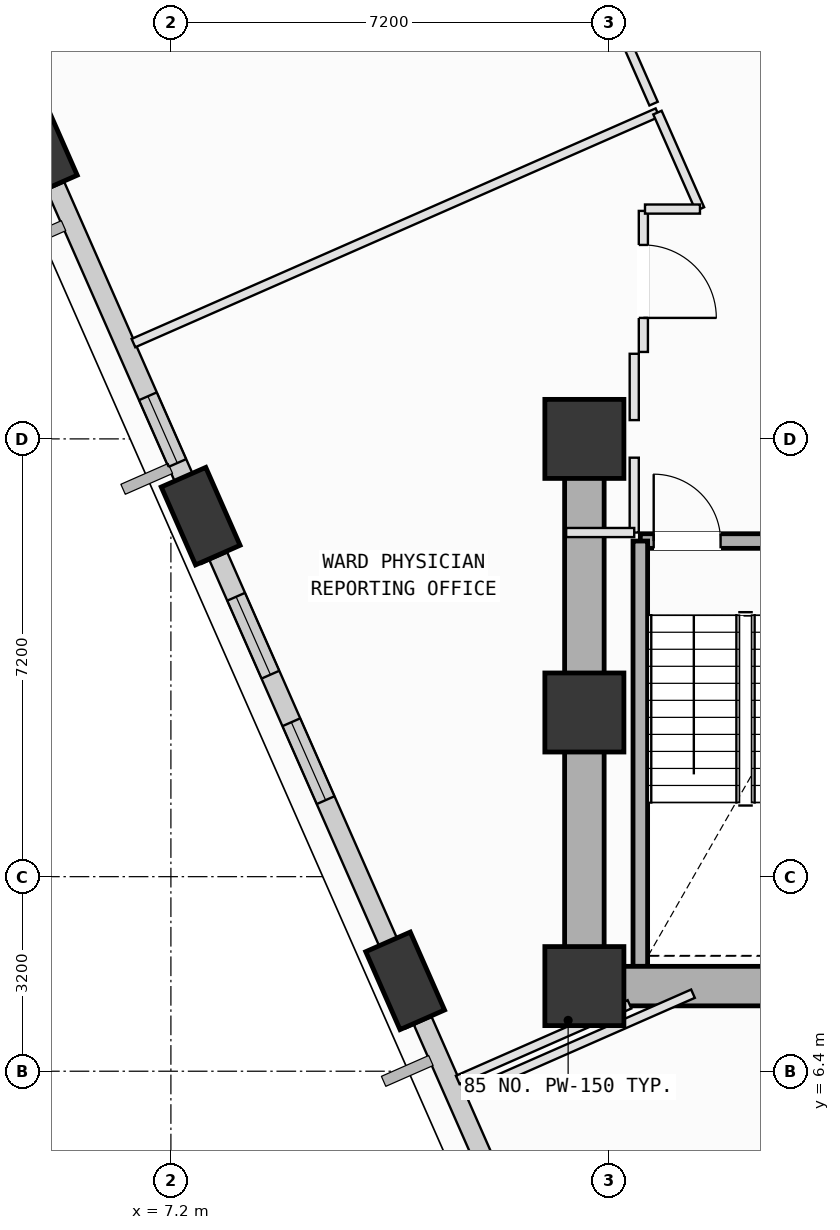
"""IFC4 building model, lengths in metres.
Left out: names, types, materials, properties, quantities, classifications, styles, units other than length and angle.
Written with IfcOpenShell. Run it as: python <this file> out.ifc"""

import sys

from ifc_helpers import new_model, si_unit, direction, frame, frame_2d, origin, origin_2d, place, context, subcontext, project, spatial, rectangle, extrude, element, fill, save


model = new_model("IFC4")
c1 = context("Model", 3, precision=1e-05, world=origin(), true_north=direction((0.0, 1.0)))
c2 = subcontext(c1, "Body", "Model", "MODEL_VIEW")
j1 = project(units=[si_unit("LENGTHUNIT", "METRE"), si_unit("PLANEANGLEUNIT", "RADIAN")], contexts=[c1])
p1 = place(None, origin())
s1 = spatial("IfcSite", under=j1, at=p1, CompositionType="ELEMENT")
p2 = place(p1, origin())
s2 = spatial("IfcBuilding", under=s1, at=p2, CompositionType="ELEMENT")
p3 = place(p2, frame((0.0, 0.0, 124.4)))
s3 = spatial("IfcBuildingStorey", under=s2, at=p3, CompositionType="ELEMENT", Elevation=124.4)
for number, where, z_axis, x_axis in (
    (1, (14.0, 7.8, 0.0), (0.0, 0.0, 1.0), (1.0, 0.0, 0.0)),
    (2, (14.0, 12.3, 0.0), (0.0, 0.0, 1.0), (1.0, 0.0, 0.0)),
    (3, (14.0, 16.8, 0.0), (0.0, 0.0, 1.0), (1.0, 0.0, 0.0)),
):
    element("IfcColumn", number, at=place(p3, frame(where, z_axis=z_axis, x_axis=x_axis)), inside=s3, PredefinedType="COLUMN", context=c2, shape_type="SweptSolid", body=[
        extrude(rectangle(XDim=1.3, YDim=1.3, at=origin_2d()), origin(), (0.0, 0.0, 1.0), 4.0),
    ])
p4 = place(p3, frame((5.011, 21.616, 0.002), z_axis=(0.014134085479, -0.117561620848, 0.992965000859), x_axis=(-0.508356859263, 0.854299122945, 0.108380404941)))
e4 = element("IfcColumn", 4, at=p4, inside=s3, PredefinedType="COLUMN", context=c2, shape_type="SweptSolid", body=[
    extrude(rectangle(XDim=1.4, YDim=0.8, at=origin_2d()), origin(), (0.0, 0.0, 1.0), 4.025),
])
p5 = place(p3, frame((7.689, 15.529, 0.002), z_axis=(0.039028472519, -0.106402663027, 0.993556868847), x_axis=(-0.691283232583, 0.715098751962, 0.103736528239)))
e5 = element("IfcColumn", 5, at=p5, inside=s3, PredefinedType="COLUMN", context=c2, shape_type="SweptSolid", body=[
    extrude(rectangle(XDim=1.4, YDim=0.8, at=origin_2d()), origin(), (0.0, 0.0, 1.0), 4.022),
])
p6 = place(p3, frame((11.052, 7.886, 0.002), z_axis=(0.070387084665, -0.092231352319, 0.993246714549), x_axis=(-0.871708970216, 0.478378450059, 0.106195714432)))
e6 = element("IfcColumn", 6, at=p6, inside=s3, PredefinedType="COLUMN", context=c2, shape_type="SweptSolid", body=[
    extrude(rectangle(XDim=1.4, YDim=0.8, at=origin_2d()), origin(), (0.0, 0.0, 1.0), 4.023),
])
p7 = place(p3, frame((7.581, 15.775, 0.0), z_axis=(0.0, 0.0, 1.0), x_axis=(-0.40276317854, 0.915304223749, 0.0)))
e7 = element("IfcWall", 7, at=p7, inside=s3, PredefinedType="SOLIDWALL", context=c2, shape_type="SweptSolid", body=[
    extrude(rectangle(XDim=5.662, YDim=0.32, at=frame_2d((2.831, 0.0))), origin(), (0.0, 0.0, 1.0), 3.165),
])
p8 = place(p7, frame((0.686, 0.0, 0.75)))
e8 = element("IfcOpeningElement", 8, at=p8, cuts=e7, PredefinedType="OPENING", context=c2, shape_type="SweptSolid", body=[
    extrude(rectangle(XDim=1.2, YDim=1.75, at=frame_2d((0.6, 0.875))), frame((0.0, 0.17, 0.0), z_axis=(0.0, -1.0, 0.0), x_axis=(1.0, 0.0, 0.0)), (0.0, 0.0, 1.0), 0.34),
])
p9 = place(p3, frame((10.945, 8.13, 0.0), z_axis=(0.0, 0.0, 1.0), x_axis=(-0.402756399989, 0.915307206498, 0.0)))
e9 = element("IfcWall", 9, at=p9, inside=s3, PredefinedType="SOLIDWALL", context=c2, shape_type="SweptSolid", body=[
    extrude(rectangle(XDim=7.36, YDim=0.32, at=frame_2d((3.68, 0.0))), origin(), (0.0, 0.0, 1.0), 3.165),
])
p10 = place(p9, frame((2.981, 0.0, 0.75)))
e10 = element("IfcOpeningElement", 10, at=p10, cuts=e9, PredefinedType="OPENING", context=c2, shape_type="SweptSolid", body=[
    extrude(rectangle(XDim=1.4, YDim=1.85, at=frame_2d((0.7, 0.925))), frame((0.0, 0.17, 0.0), z_axis=(0.0, -1.0, 0.0), x_axis=(1.0, 0.0, 0.0)), (0.0, 0.0, 1.0), 0.34),
])
p11 = place(p9, frame((5.236, 0.0, 0.75)))
e11 = element("IfcOpeningElement", 11, at=p11, cuts=e9, PredefinedType="OPENING", context=c2, shape_type="SweptSolid", body=[
    extrude(rectangle(XDim=1.4, YDim=1.85, at=frame_2d((0.7, 0.925))), frame((0.0, 0.17, 0.0), z_axis=(0.0, -1.0, 0.0), x_axis=(1.0, 0.0, 0.0)), (0.0, 0.0, 1.0), 0.34),
])
p12 = place(p3, frame((13.849, 1.531, 0.0), z_axis=(0.0, 0.0, 1.0), x_axis=(-0.402768851229, 0.915301727563, 0.0)))
e12 = element("IfcWall", 12, at=p12, inside=s3, PredefinedType="SOLIDWALL", context=c2, shape_type="SweptSolid", body=[
    extrude(rectangle(XDim=6.223, YDim=0.32, at=frame_2d((3.112, 0.0))), origin(), (0.0, 0.0, 1.0), 3.165),
])
p13 = place(p12, frame((1.42, 0.0, 0.75)))
e13 = element("IfcOpeningElement", 13, at=p13, cuts=e12, PredefinedType="OPENING", context=c2, shape_type="SweptSolid", body=[
    extrude(rectangle(XDim=1.8, YDim=2.05, at=frame_2d((0.9, 1.025))), frame((0.0, 0.17, 0.0), z_axis=(0.0, -1.0, 0.0), x_axis=(1.0, 0.0, 0.0)), (0.0, 0.0, 1.0), 0.34),
])
p14 = place(p3, frame((14.92, 15.12, 0.0), z_axis=(0.0, 0.0, 1.0), x_axis=(1.0, 0.0, 0.0)))
e14 = element("IfcWall", 14, at=p14, inside=s3, PredefinedType="SOLIDWALL", context=c2, shape_type="SweptSolid", body=[
    extrude(rectangle(XDim=3.46, YDim=0.24, at=frame_2d((1.73, 0.0))), origin(), (0.0, 0.0, 1.0), 3.78),
])
p15 = place(p14, frame((0.22, 0.0, 0.0)))
e15 = element("IfcOpeningElement", 15, at=p15, cuts=e14, PredefinedType="OPENING", context=c2, shape_type="SweptSolid", body=[
    extrude(rectangle(XDim=1.1, YDim=2.15, at=frame_2d((0.55, 1.075))), frame((0.0, 0.13, 0.0), z_axis=(0.0, -1.0, 0.0), x_axis=(1.0, 0.0, 0.0)), (0.0, 0.0, 1.0), 0.26),
])
p16 = place(p3, frame((14.92, 8.125, 0.0), z_axis=(0.0, 0.0, 1.0), x_axis=(0.0, 1.0, 0.0)))
e16 = element("IfcWall", 16, at=p16, inside=s3, PredefinedType="SOLIDWALL", context=c2, shape_type="SweptSolid", body=[
    extrude(rectangle(XDim=6.995, YDim=0.24, at=frame_2d((3.498, 0.0))), origin(), (0.0, 0.0, 1.0), 3.78),
])
p17 = place(p3, frame((14.0, 7.8, 0.0), z_axis=(0.0, 0.0, 1.0), x_axis=(1.0, 0.0, 0.0)))
e17 = element("IfcWall", 17, at=p17, inside=s3, PredefinedType="SHEAR", context=c2, shape_type="SweptSolid", body=[
    extrude(rectangle(XDim=10.8, YDim=0.65, at=frame_2d((5.4, 0.0))), origin(), (0.0, 0.0, 1.0), 3.78),
])
p18 = place(p3, frame((14.0, 16.8, 0.0), z_axis=(0.0, 0.0, 1.0), x_axis=(0.0, -1.0, 0.0)))
e18 = element("IfcWall", 18, at=p18, inside=s3, PredefinedType="SHEAR", context=c2, shape_type="SweptSolid", body=[
    extrude(rectangle(XDim=9.0, YDim=0.65, at=frame_2d((4.5, 0.0))), origin(), (0.0, 0.0, 1.0), 3.78),
])
p19 = place(p3, frame((12.022, 6.019, 0.0), z_axis=(0.0, 0.0, 1.0), x_axis=(0.915325537468, 0.402714738318, 0.0)))
e19 = element("IfcWall", 19, at=p19, inside=s3, PredefinedType="PARTITIONING", context=c2, shape_type="SweptSolid", body=[
    extrude(rectangle(XDim=4.112, YDim=0.15, at=frame_2d((2.056, 0.0))), origin(), (0.0, 0.0, 1.0), 3.78),
])
p20 = place(p3, frame((14.97, 20.55, 0.0), z_axis=(0.0, 0.0, 1.0), x_axis=(0.0, -1.0, 0.0)))
e20 = element("IfcWall", 20, at=p20, inside=s3, PredefinedType="PARTITIONING", context=c2, shape_type="SweptSolid", body=[
    extrude(rectangle(XDim=2.32, YDim=0.15, at=frame_2d((1.16, 0.0))), origin(), (0.0, 0.0, 1.0), 3.78),
])
p21 = place(p20, frame((0.56, 0.0, 0.0)))
e21 = element("IfcOpeningElement", 21, at=p21, cuts=e20, PredefinedType="OPENING", context=c2, shape_type="SweptSolid", body=[
    extrude(rectangle(XDim=1.2, YDim=2.15, at=frame_2d((0.6, 1.075))), frame((0.0, 0.085, 0.0), z_axis=(0.0, -1.0, 0.0), x_axis=(1.0, 0.0, 0.0)), (0.0, 0.0, 1.0), 0.17),
])
p22 = place(p3, frame((14.82, 18.2, 0.0), z_axis=(0.0, 0.0, 1.0), x_axis=(0.0, -1.0, 0.0)))
e22 = element("IfcWall", 22, at=p22, inside=s3, PredefinedType="PARTITIONING", context=c2, shape_type="SweptSolid", body=[
    extrude(rectangle(XDim=1.091, YDim=0.15, at=frame_2d((0.545, 0.0))), origin(), (0.0, 0.0, 1.0), 3.78),
])
p23 = place(p3, frame((14.82, 16.491, 0.0), z_axis=(0.0, 0.0, 1.0), x_axis=(0.0, -1.0, 0.0)))
e23 = element("IfcWall", 23, at=p23, inside=s3, PredefinedType="PARTITIONING", context=c2, shape_type="SweptSolid", body=[
    extrude(rectangle(XDim=1.231, YDim=0.15, at=frame_2d((0.615, 0.0))), origin(), (0.0, 0.0, 1.0), 3.78),
])
p24 = place(p3, frame((14.82, 15.26, 0.0), z_axis=(0.0, 0.0, 1.0), x_axis=(-1.0, 0.0, 0.0)))
e24 = element("IfcWall", 24, at=p24, inside=s3, PredefinedType="PARTITIONING", context=c2, shape_type="SweptSolid", body=[
    extrude(rectangle(XDim=1.12, YDim=0.15, at=frame_2d((0.56, 0.0))), origin(), (0.0, 0.0, 1.0), 3.78),
])
p25 = place(p3, frame((14.742, 7.5, 0.0), z_axis=(0.0, 0.0, 1.0), x_axis=(-0.915322030836, -0.402722708408, 0.0)))
e25 = element("IfcWall", 25, at=p25, inside=s3, PredefinedType="PARTITIONING", context=c2, shape_type="SweptSolid", body=[
    extrude(rectangle(XDim=3.086, YDim=0.15, at=frame_2d((1.543, 0.0))), origin(), (0.0, 0.0, 1.0), 3.78),
])
p26 = place(p3, frame((11.132, 7.135, 0.0), z_axis=(0.0, 0.0, 1.0), x_axis=(-0.402415129889, 0.915457297331, 0.0)))
e26 = element("IfcWall", 26, at=p26, inside=s3, PredefinedType="PARTITIONING", context=c2, shape_type="SweptSolid", body=[
    extrude(rectangle(XDim=0.987, YDim=0.15, at=frame_2d((0.493, 0.0))), origin(), (0.0, 0.0, 1.0), 3.165),
])
p27 = place(p3, frame((7.77, 14.774, 0.0), z_axis=(0.0, 0.0, 1.0), x_axis=(-0.402251814951, 0.915529069647, 0.0)))
e27 = element("IfcWall", 27, at=p27, inside=s3, PredefinedType="PARTITIONING", context=c2, shape_type="SweptSolid", body=[
    extrude(rectangle(XDim=0.992, YDim=0.15, at=frame_2d((0.496, 0.0))), origin(), (0.0, 0.0, 1.0), 3.165),
])
p28 = place(p3, frame((6.584, 18.376, 0.0), z_axis=(0.0, 0.0, 1.0), x_axis=(0.915349059645, 0.402661270806, 0.0)))
e28 = element("IfcWall", 28, at=p28, inside=s3, PredefinedType="PARTITIONING", context=c2, shape_type="SweptSolid", body=[
    extrude(rectangle(XDim=9.415, YDim=0.15, at=frame_2d((4.708, 0.0))), origin(), (0.0, 0.0, 1.0), 3.78),
])
p29 = place(p3, frame((15.202, 22.167, 0.0), z_axis=(0.0, 0.0, 1.0), x_axis=(0.403092455814, -0.915159260493, 0.0)))
e29 = element("IfcWall", 29, at=p29, inside=s3, PredefinedType="PARTITIONING", context=c2, shape_type="SweptSolid", body=[
    extrude(rectangle(XDim=1.734, YDim=0.15, at=frame_2d((0.867, 0.0))), origin(), (0.0, 0.0, 1.0), 3.78),
])
p30 = place(p3, frame((15.901, 20.58, 0.0), z_axis=(0.0, 0.0, 1.0), x_axis=(-1.0, 0.0, 0.0)))
e30 = element("IfcWall", 30, at=p30, inside=s3, PredefinedType="PARTITIONING", context=c2, shape_type="SweptSolid", body=[
    extrude(rectangle(XDim=0.904, YDim=0.15, at=frame_2d((0.452, 0.0))), origin(), (0.0, 0.0, 1.0), 3.78),
])
p31 = place(p3, frame((9.805, 34.433, 0.0), z_axis=(0.0, 0.0, 1.0), x_axis=(0.402775689137, -0.915298718583, 0.0)))
e31 = element("IfcWall", 31, at=p31, inside=s3, PredefinedType="PARTITIONING", context=c2, shape_type="SweptSolid", body=[
    extrude(rectangle(XDim=13.241, YDim=0.15, at=frame_2d((6.62, 0.0))), origin(), (0.0, 0.0, 1.0), 2.965),
])
p32 = place(p31, frame((6.02, 0.0, 0.0)))
e32 = element("IfcOpeningElement", 32, at=p32, cuts=e31, PredefinedType="OPENING", context=c2, shape_type="SweptSolid", body=[
    extrude(rectangle(XDim=1.2, YDim=2.15, at=frame_2d((0.6, 1.075))), frame((0.0, 0.085, 0.0), z_axis=(0.0, -1.0, 0.0), x_axis=(1.0, 0.0, 0.0)), (0.0, 0.0, 1.0), 0.17),
])
p33 = place(p3, frame((18.914, 20.807, 0.0), z_axis=(0.0, 0.0, 1.0), x_axis=(-0.402653023247, 0.915352687695, 0.0)))
e33 = element("IfcWall", 33, at=p33, inside=s3, PredefinedType="PARTITIONING", context=c2, shape_type="SweptSolid", body=[
    extrude(rectangle(XDim=9.75, YDim=0.15, at=frame_2d((4.875, 0.0))), origin(), (0.0, 0.0, 1.0), 3.78),
])
p34 = place(p33, frame((4.275, 0.0, 0.0)))
e34 = element("IfcOpeningElement", 34, at=p34, cuts=e33, PredefinedType="OPENING", context=c2, shape_type="SweptSolid", body=[
    extrude(rectangle(XDim=1.2, YDim=2.15, at=frame_2d((0.6, 1.075))), frame((0.0, 0.085, 0.0), z_axis=(0.0, -1.0, 0.0), x_axis=(1.0, 0.0, 0.0)), (0.0, 0.0, 1.0), 0.17),
])
p35 = place(p8, origin())
e35 = element("IfcWindow", 35, at=p35, inside=s3, PartitioningType="SINGLE_PANEL", PredefinedType="WINDOW", context=c2, shape_type="SweptSolid", body=[
    extrude(rectangle(XDim=1.2, YDim=1.75, at=frame_2d((0.6, 0.875))), frame((0.0, 0.03, 0.0), z_axis=(0.0, -1.0, 0.0), x_axis=(1.0, 0.0, 0.0)), (0.0, 0.0, 1.0), 0.06),
])
fill(e8, e35)
p36 = place(p10, origin())
e36 = element("IfcWindow", 36, at=p36, inside=s3, PartitioningType="SINGLE_PANEL", PredefinedType="WINDOW", context=c2, shape_type="SweptSolid", body=[
    extrude(rectangle(XDim=1.4, YDim=1.85, at=frame_2d((0.7, 0.925))), frame((0.0, 0.03, 0.0), z_axis=(0.0, -1.0, 0.0), x_axis=(1.0, 0.0, 0.0)), (0.0, 0.0, 1.0), 0.06),
])
fill(e10, e36)
p37 = place(p11, origin())
e37 = element("IfcWindow", 37, at=p37, inside=s3, PartitioningType="SINGLE_PANEL", PredefinedType="WINDOW", context=c2, shape_type="SweptSolid", body=[
    extrude(rectangle(XDim=1.4, YDim=1.85, at=frame_2d((0.7, 0.925))), frame((0.0, 0.03, 0.0), z_axis=(0.0, -1.0, 0.0), x_axis=(1.0, 0.0, 0.0)), (0.0, 0.0, 1.0), 0.06),
])
fill(e11, e37)
p38 = place(p15, origin())
e38 = element("IfcDoor", 38, at=p38, inside=s3, OperationType="SINGLE_SWING_LEFT", PredefinedType="DOOR", context=c2, shape_type="SweptSolid", body=[
    extrude(rectangle(XDim=1.1, YDim=2.15, at=frame_2d((0.55, 1.075))), frame((0.0, 0.025, 0.0), z_axis=(0.0, -1.0, 0.0), x_axis=(1.0, 0.0, 0.0)), (0.0, 0.0, 1.0), 0.05),
])
fill(e15, e38)
p39 = place(p21, origin())
e39 = element("IfcDoor", 39, at=p39, inside=s3, OperationType="SINGLE_SWING_RIGHT", PredefinedType="DOOR", context=c2, shape_type="SweptSolid", body=[
    extrude(rectangle(XDim=1.2, YDim=2.15, at=frame_2d((0.6, 1.075))), frame((0.0, 0.025, 0.0), z_axis=(0.0, -1.0, 0.0), x_axis=(1.0, 0.0, 0.0)), (0.0, 0.0, 1.0), 0.05),
])
fill(e21, e39)
save(model, sys.argv[1])
